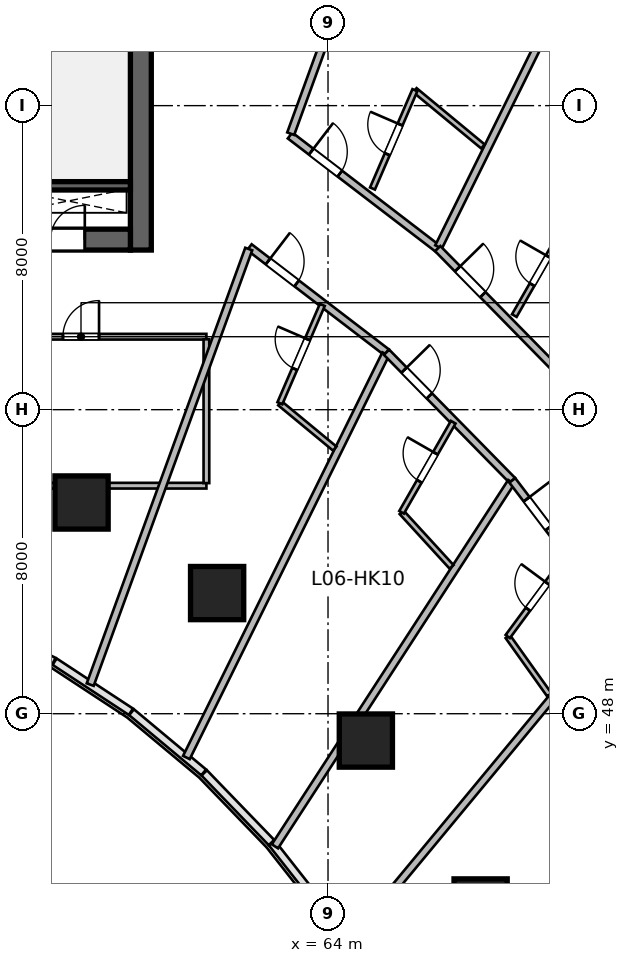
"""IFC4 building model, lengths in metres.
Left out: names, types, materials, properties, quantities, classifications, styles, units other than length and angle.
Written with IfcOpenShell. Run it as: python <this file> out.ifc"""

import sys

from ifc_helpers import new_model, si_unit, direction, frame, frame_2d, origin, origin_2d, place, context, subcontext, project, spatial, rectangle, circle, extrude, source, transform, mapped, element, fill, save


model = new_model("IFC4")
c1 = context("Model", 3, precision=1e-05, world=origin(), true_north=direction((0.0, 1.0)))
c2 = subcontext(c1, "Body", "Model", "MODEL_VIEW")
j1 = project(units=[si_unit("LENGTHUNIT", "METRE"), si_unit("PLANEANGLEUNIT", "RADIAN")], contexts=[c1])
p1 = place(None, origin())
s1 = spatial("IfcSite", under=j1, at=p1, CompositionType="ELEMENT")
p2 = place(p1, origin())
s2 = spatial("IfcBuilding", under=s1, at=p2, CompositionType="ELEMENT")
p3 = place(p2, frame((0.0, 0.0, 35.4)))
s3 = spatial("IfcBuildingStorey", under=s2, at=p3, CompositionType="ELEMENT", Elevation=35.4)
m1 = source(origin(), c2, "Body", "SweptSolid", [
    extrude(rectangle(XDim=12.0, YDim=0.55, at=frame_2d((6.0, 0.0))), origin(), (0.0, 0.0, 1.0), 3.6),
])
p4 = place(p3, frame((59.075, 60.2, 0.0), z_axis=(0.0, 0.0, 1.0), x_axis=(0.0, 1.0, 0.0)))
e1 = element("IfcWall", 1, at=p4, inside=s3, PredefinedType="SHEAR", context=c2, shape_type="MappedRepresentation", body=[
    mapped(m1, transform((0.0, 0.0, 0.0), scale=1.0)),
])
m2 = source(origin(), c2, "Body", "SweptSolid", [
    extrude(rectangle(XDim=21.6, YDim=0.55, at=frame_2d((10.8, 0.0))), origin(), (0.0, 0.0, 1.0), 3.6),
])
p5 = place(p3, frame((37.2, 60.475, 0.0), z_axis=(0.0, 0.0, 1.0), x_axis=(1.0, 0.0, 0.0)))
e2 = element("IfcWall", 2, at=p5, inside=s3, PredefinedType="SHEAR", context=c2, shape_type="MappedRepresentation", body=[
    mapped(m2, transform((0.0, 0.0, 0.0), scale=1.0)),
])
p6 = place(p5, frame((1.1, 0.0, 0.0)))
e3 = element("IfcOpeningElement", 3, at=p6, cuts=e2, PredefinedType="OPENING", context=c2, shape_type="SweptSolid", body=[
    extrude(rectangle(XDim=1.15, YDim=2.15, at=frame_2d((0.575, 1.075))), frame((0.0, 0.285, 0.0), z_axis=(0.0, -1.0, 0.0), x_axis=(1.0, 0.0, 0.0)), (0.0, 0.0, 1.0), 0.57),
])
p7 = place(p5, frame((19.5, 0.0, 0.0)))
e4 = element("IfcOpeningElement", 4, at=p7, cuts=e2, PredefinedType="OPENING", context=c2, shape_type="SweptSolid", body=[
    extrude(rectangle(XDim=0.9, YDim=2.1, at=frame_2d((0.45, 1.05))), frame((0.0, 0.285, 0.0), z_axis=(0.0, -1.0, 0.0), x_axis=(1.0, 0.0, 0.0)), (0.0, 0.0, 1.0), 0.57),
])
p8 = place(p5, frame((12.02, 0.0, 0.0)))
e5 = element("IfcOpeningElement", 5, at=p8, cuts=e2, PredefinedType="OPENING", context=c2, shape_type="SweptSolid", body=[
    extrude(rectangle(XDim=1.6, YDim=2.15, at=frame_2d((0.8, 1.075))), frame((0.0, 0.285, 0.0), z_axis=(0.0, -1.0, 0.0), x_axis=(1.0, 0.0, 0.0)), (0.0, 0.0, 1.0), 0.57),
])
m3 = source(origin(), c2, "Body", "SweptSolid", [
    extrude(rectangle(XDim=3.27, YDim=0.22, at=frame_2d((1.635, 0.0))), origin(), (0.0, 0.0, 1.0), 3.6),
])
p9 = place(p3, frame((55.53, 61.89, 0.0), z_axis=(0.0, 0.0, 1.0), x_axis=(1.0, 0.0, 0.0)))
e6 = element("IfcWall", 6, at=p9, inside=s3, PredefinedType="SHEAR", context=c2, shape_type="MappedRepresentation", body=[
    mapped(m3, transform((0.0, 0.0, 0.0), scale=1.0)),
])
m4 = source(origin(), c2, "Body", "SweptSolid", [
    extrude(circle(Radius=0.7, at=origin_2d()), origin(), (0.0, 0.0, 1.0), 3.6),
])
for number, where, z_axis, x_axis in (
    (7, (57.515, 53.558, 0.0), (0.0, 0.0, 1.0), (0.289, 0.957, 0.0)),
    (8, (61.082, 51.175, 0.0), (0.0, 0.0, 1.0), (0.409, 0.912, 0.0)),
    (9, (64.996, 47.294, 0.0), (0.0, 0.0, 1.0), (0.558, 0.83, 0.0)),
    (10, (68.015, 42.955, 0.0), (0.0, 0.0, 1.0), (0.691, 0.723, 0.0)),
):
    element("IfcColumn", number, at=place(p3, frame(where, z_axis=z_axis, x_axis=x_axis)), inside=s3, PredefinedType="COLUMN", context=c2, shape_type="MappedRepresentation", body=[
        mapped(m4, transform((0.0, 0.0, 0.0), scale=1.0)),
    ])
m5 = source(origin(), c2, "Body", "SweptSolid", [
    extrude(rectangle(XDim=6.6, YDim=0.15, at=frame_2d((3.3, 0.0))), origin(), (0.0, 0.0, 1.0), 2.803),
])
p10 = place(p3, frame((54.2, 54.0, 0.0), z_axis=(0.0, 0.0, 1.0), x_axis=(1.0, 0.0, 0.0)))
e11 = element("IfcWall", 11, at=p10, inside=s3, PredefinedType="PARTITIONING", context=c2, shape_type="MappedRepresentation", body=[
    mapped(m5, transform((0.0, 0.0, 0.0), scale=1.0)),
])
m6 = source(origin(), c2, "Body", "SweptSolid", [
    extrude(rectangle(XDim=6.6, YDim=0.15, at=frame_2d((3.3, 0.0))), origin(), (0.0, 0.0, 1.0), 3.36),
])
p11 = place(p3, frame((54.2, 57.92, 0.0), z_axis=(0.0, 0.0, 1.0), x_axis=(1.0, 0.0, 0.0)))
e12 = element("IfcWall", 12, at=p11, inside=s3, PredefinedType="PARTITIONING", context=c2, shape_type="MappedRepresentation", body=[
    mapped(m6, transform((0.0, 0.0, 0.0), scale=1.0)),
])
p12 = place(p11, frame((2.825, 0.0, 0.0)))
e13 = element("IfcOpeningElement", 13, at=p12, cuts=e12, PredefinedType="OPENING", context=c2, shape_type="SweptSolid", body=[
    extrude(rectangle(XDim=0.95, YDim=2.1, at=frame_2d((0.475, 1.05))), frame((0.0, 0.085, 0.0), z_axis=(0.0, -1.0, 0.0), x_axis=(1.0, 0.0, 0.0)), (0.0, 0.0, 1.0), 0.17),
])
m7 = source(origin(), c2, "Body", "SweptSolid", [
    extrude(rectangle(XDim=3.785, YDim=0.15, at=frame_2d((1.893, 0.0))), origin(), (0.0, 0.0, 1.0), 3.36),
])
p13 = place(p3, frame((60.8, 54.067, 0.0), z_axis=(0.0, 0.0, 1.0), x_axis=(0.0, 1.0, 0.0)))
e14 = element("IfcWall", 14, at=p13, inside=s3, PredefinedType="PARTITIONING", context=c2, shape_type="MappedRepresentation", body=[
    mapped(m7, transform((0.0, 0.0, 0.0), scale=1.0)),
])
m8 = source(origin(), c2, "Body", "SweptSolid", [
    extrude(rectangle(XDim=4.895, YDim=0.195, at=frame_2d((2.447, 0.0))), origin(), (0.0, 0.0, 1.0), 3.36),
])
p14 = place(p3, frame((63.001, 63.214, 0.0), z_axis=(0.0, 0.0, 1.0), x_axis=(0.793896075849, -0.608053468661, 0.0)))
e15 = element("IfcWall", 15, at=p14, inside=s3, PredefinedType="PARTITIONING", context=c2, shape_type="MappedRepresentation", body=[
    mapped(m8, transform((0.0, 0.0, 0.0), scale=1.0)),
])
p15 = place(p14, frame((0.7, 0.0, 0.0)))
e16 = element("IfcOpeningElement", 16, at=p15, cuts=e15, PredefinedType="OPENING", context=c2, shape_type="SweptSolid", body=[
    extrude(rectangle(XDim=0.95, YDim=2.15, at=frame_2d((0.475, 1.075))), frame((0.0, 0.107, 0.0), z_axis=(0.0, -1.0, 0.0), x_axis=(1.0, 0.0, 0.0)), (0.0, 0.0, 1.0), 0.215),
])
m9 = source(origin(), c2, "Body", "SweptSolid", [
    extrude(rectangle(XDim=12.088, YDim=0.195, at=frame_2d((6.044, 0.0))), origin(), (0.0, 0.0, 1.0), 3.36),
])
p16 = place(p3, frame((63.019, 63.262, 0.0), z_axis=(0.0, 0.0, 1.0), x_axis=(0.34203007529, 0.939689005787, 0.0)))
e17 = element("IfcWall", 17, at=p16, inside=s3, PredefinedType="PARTITIONING", context=c2, shape_type="MappedRepresentation", body=[
    mapped(m9, transform((0.0, 0.0, 0.0), scale=1.0)),
])
m10 = source(origin(), c2, "Body", "SweptSolid", [
    extrude(rectangle(XDim=11.77, YDim=0.195, at=frame_2d((5.885, 0.0))), origin(), (0.0, 0.0, 1.0), 3.36),
])
p17 = place(p3, frame((66.909, 60.282, 0.0), z_axis=(0.0, 0.0, 1.0), x_axis=(0.44286060326, 0.896590478468, 0.0)))
e18 = element("IfcWall", 18, at=p17, inside=s3, PredefinedType="PARTITIONING", context=c2, shape_type="MappedRepresentation", body=[
    mapped(m10, transform((0.0, 0.0, 0.0), scale=1.0)),
])
m11 = source(origin(), c2, "Body", "SweptSolid", [
    extrude(rectangle(XDim=2.324, YDim=0.14, at=frame_2d((1.162, 0.0))), origin(), (0.0, 0.0, 1.0), 3.36),
])
p18 = place(p3, frame((66.286, 64.407, 0.0), z_axis=(0.0, 0.0, 1.0), x_axis=(0.770746444956, -0.637141991701, 0.0)))
e19 = element("IfcWall", 19, at=p18, inside=s3, PredefinedType="PARTITIONING", context=c2, shape_type="MappedRepresentation", body=[
    mapped(m11, transform((0.0, 0.0, 0.0), scale=1.0)),
])
m12 = source(origin(), c2, "Body", "SweptSolid", [
    extrude(rectangle(XDim=2.818, YDim=0.14, at=frame_2d((1.409, 0.0))), origin(), (0.0, 0.0, 1.0), 3.36),
])
p19 = place(p3, frame((65.17, 61.819, 0.0), z_axis=(0.0, 0.0, 1.0), x_axis=(0.395894859341, 0.918295845764, 0.0)))
e20 = element("IfcWall", 20, at=p19, inside=s3, PredefinedType="PARTITIONING", context=c2, shape_type="MappedRepresentation", body=[
    mapped(m12, transform((0.0, 0.0, 0.0), scale=1.0)),
])
p20 = place(p19, frame((0.984, 0.0, 0.0)))
e21 = element("IfcOpeningElement", 21, at=p20, cuts=e20, PredefinedType="OPENING", context=c2, shape_type="SweptSolid", body=[
    extrude(rectangle(XDim=0.85, YDim=2.05, at=frame_2d((0.425, 1.025))), frame((0.0, 0.08, 0.0), z_axis=(0.0, -1.0, 0.0), x_axis=(1.0, 0.0, 0.0)), (0.0, 0.0, 1.0), 0.16),
])
m13 = source(origin(), c2, "Body", "SweptSolid", [
    extrude(rectangle(XDim=4.546, YDim=0.195, at=frame_2d((2.273, 0.0))), origin(), (0.0, 0.0, 1.0), 3.36),
])
p21 = place(p3, frame((61.931, 60.275, 0.0), z_axis=(0.0, 0.0, 1.0), x_axis=(0.793907931297, -0.608037989457, 0.0)))
e22 = element("IfcWall", 22, at=p21, inside=s3, PredefinedType="PARTITIONING", context=c2, shape_type="MappedRepresentation", body=[
    mapped(m13, transform((0.0, 0.0, 0.0), scale=1.0)),
])
p22 = place(p21, frame((0.616, 0.0, 0.0)))
e23 = element("IfcOpeningElement", 23, at=p22, cuts=e22, PredefinedType="OPENING", context=c2, shape_type="SweptSolid", body=[
    extrude(rectangle(XDim=0.95, YDim=2.15, at=frame_2d((0.475, 1.075))), frame((0.0, 0.107, 0.0), z_axis=(0.0, -1.0, 0.0), x_axis=(1.0, 0.0, 0.0)), (0.0, 0.0, 1.0), 0.215),
])
m14 = source(origin(), c2, "Body", "SweptSolid", [
    extrude(rectangle(XDim=12.196, YDim=0.195, at=frame_2d((6.098, 0.0))), origin(), (0.0, 0.0, 1.0), 3.36),
])
p23 = place(p3, frame((57.742, 48.766, 0.0), z_axis=(0.0, 0.0, 1.0), x_axis=(0.342022711534, 0.939691686031, 0.0)))
e24 = element("IfcWall", 24, at=p23, inside=s3, PredefinedType="PARTITIONING", context=c2, shape_type="MappedRepresentation", body=[
    mapped(m14, transform((0.0, 0.0, 0.0), scale=1.0)),
])
m15 = source(origin(), c2, "Body", "SweptSolid", [
    extrude(rectangle(XDim=11.844, YDim=0.195, at=frame_2d((5.922, 0.0))), origin(), (0.0, 0.0, 1.0), 3.36),
])
p24 = place(p3, frame((60.273, 46.848, 0.0), z_axis=(0.0, 0.0, 1.0), x_axis=(0.442871152218, 0.896585267854, 0.0)))
e25 = element("IfcWall", 25, at=p24, inside=s3, PredefinedType="PARTITIONING", context=c2, shape_type="MappedRepresentation", body=[
    mapped(m15, transform((0.0, 0.0, 0.0), scale=1.0)),
])
m16 = source(origin(), c2, "Body", "SweptSolid", [
    extrude(rectangle(XDim=1.873, YDim=0.14, at=frame_2d((0.937, 0.0))), origin(), (0.0, 0.0, 1.0), 3.36),
])
p25 = place(p3, frame((62.734, 56.169, 0.0), z_axis=(0.0, 0.0, 1.0), x_axis=(0.77069451688, -0.637204803537, 0.0)))
e26 = element("IfcWall", 26, at=p25, inside=s3, PredefinedType="PARTITIONING", context=c2, shape_type="MappedRepresentation", body=[
    mapped(m16, transform((0.0, 0.0, 0.0), scale=1.0)),
])
m17 = source(origin(), c2, "Body", "SweptSolid", [
    extrude(rectangle(XDim=2.817, YDim=0.14, at=frame_2d((1.409, 0.0))), origin(), (0.0, 0.0, 1.0), 3.36),
])
p26 = place(p3, frame((62.734, 56.169, 0.0), z_axis=(0.0, 0.0, 1.0), x_axis=(0.395999429727, 0.918250756415, 0.0)))
e27 = element("IfcWall", 27, at=p26, inside=s3, PredefinedType="PARTITIONING", context=c2, shape_type="MappedRepresentation", body=[
    mapped(m17, transform((0.0, 0.0, 0.0), scale=1.0)),
])
p27 = place(p26, frame((0.984, 0.0, 0.0)))
e28 = element("IfcOpeningElement", 28, at=p27, cuts=e27, PredefinedType="OPENING", context=c2, shape_type="SweptSolid", body=[
    extrude(rectangle(XDim=0.85, YDim=2.05, at=frame_2d((0.425, 1.025))), frame((0.0, 0.08, 0.0), z_axis=(0.0, -1.0, 0.0), x_axis=(1.0, 0.0, 0.0)), (0.0, 0.0, 1.0), 0.16),
])
m18 = source(origin(), c2, "Body", "SweptSolid", [
    extrude(rectangle(XDim=5.087, YDim=0.195, at=frame_2d((2.543, 0.0))), origin(), (0.0, 0.0, 1.0), 3.36),
])
p28 = place(p3, frame((66.887, 60.238, 0.0), z_axis=(0.0, 0.0, 1.0), x_axis=(0.700428330775, -0.7137227427, 0.0)))
e29 = element("IfcWall", 29, at=p28, inside=s3, PredefinedType="PARTITIONING", context=c2, shape_type="MappedRepresentation", body=[
    mapped(m18, transform((0.0, 0.0, 0.0), scale=1.0)),
])
p29 = place(p28, frame((0.746, 0.0, 0.0)))
e30 = element("IfcOpeningElement", 30, at=p29, cuts=e29, PredefinedType="OPENING", context=c2, shape_type="SweptSolid", body=[
    extrude(rectangle(XDim=0.95, YDim=2.15, at=frame_2d((0.475, 1.075))), frame((0.0, 0.107, 0.0), z_axis=(0.0, -1.0, 0.0), x_axis=(1.0, 0.0, 0.0)), (0.0, 0.0, 1.0), 0.215),
])
m19 = source(origin(), c2, "Body", "SweptSolid", [
    extrude(rectangle(XDim=2.732, YDim=0.14, at=frame_2d((1.366, 0.0))), origin(), (0.0, 0.0, 1.0), 3.36),
])
p30 = place(p3, frame((68.902, 58.476, 0.0), z_axis=(0.0, 0.0, 1.0), x_axis=(0.497254966372, 0.867604459658, 0.0)))
e31 = element("IfcWall", 31, at=p30, inside=s3, PredefinedType="PARTITIONING", context=c2, shape_type="MappedRepresentation", body=[
    mapped(m19, transform((0.0, 0.0, 0.0), scale=1.0)),
])
p31 = place(p30, frame((0.941, 0.0, 0.0)))
e32 = element("IfcOpeningElement", 32, at=p31, cuts=e31, PredefinedType="OPENING", context=c2, shape_type="SweptSolid", body=[
    extrude(rectangle(XDim=0.85, YDim=2.05, at=frame_2d((0.425, 1.025))), frame((0.0, 0.08, 0.0), z_axis=(0.0, -1.0, 0.0), x_axis=(1.0, 0.0, 0.0)), (0.0, 0.0, 1.0), 0.16),
])
m20 = source(origin(), c2, "Body", "SweptSolid", [
    extrude(rectangle(XDim=4.724, YDim=0.195, at=frame_2d((2.362, 0.0))), origin(), (0.0, 0.0, 1.0), 3.36),
])
p32 = place(p3, frame((65.541, 57.511, 0.0), z_axis=(0.0, 0.0, 1.0), x_axis=(0.700435057457, -0.713716141253, 0.0)))
e33 = element("IfcWall", 33, at=p32, inside=s3, PredefinedType="PARTITIONING", context=c2, shape_type="MappedRepresentation", body=[
    mapped(m20, transform((0.0, 0.0, 0.0), scale=1.0)),
])
p33 = place(p32, frame((0.659, 0.0, 0.0)))
e34 = element("IfcOpeningElement", 34, at=p33, cuts=e33, PredefinedType="OPENING", context=c2, shape_type="SweptSolid", body=[
    extrude(rectangle(XDim=0.95, YDim=2.15, at=frame_2d((0.475, 1.075))), frame((0.0, 0.107, 0.0), z_axis=(0.0, -1.0, 0.0), x_axis=(1.0, 0.0, 0.0)), (0.0, 0.0, 1.0), 0.215),
])
m21 = source(origin(), c2, "Body", "SweptSolid", [
    extrude(rectangle(XDim=11.429, YDim=0.195, at=frame_2d((5.714, 0.0))), origin(), (0.0, 0.0, 1.0), 3.36),
])
p34 = place(p3, frame((62.604, 44.511, 0.0), z_axis=(0.0, 0.0, 1.0), x_axis=(0.544215487077, 0.838945471187, 0.0)))
e35 = element("IfcWall", 35, at=p34, inside=s3, PredefinedType="PARTITIONING", context=c2, shape_type="MappedRepresentation", body=[
    mapped(m21, transform((0.0, 0.0, 0.0), scale=1.0)),
])
m22 = source(origin(), c2, "Body", "SweptSolid", [
    extrude(rectangle(XDim=1.947, YDim=0.14, at=frame_2d((0.973, 0.0))), origin(), (0.0, 0.0, 1.0), 3.36),
])
p35 = place(p3, frame((65.936, 53.3, 0.0), z_axis=(0.0, 0.0, 1.0), x_axis=(0.675383794012, -0.737466426888, 0.0)))
e36 = element("IfcWall", 36, at=p35, inside=s3, PredefinedType="PARTITIONING", context=c2, shape_type="MappedRepresentation", body=[
    mapped(m22, transform((0.0, 0.0, 0.0), scale=1.0)),
])
m23 = source(origin(), c2, "Body", "SweptSolid", [
    extrude(rectangle(XDim=2.731, YDim=0.14, at=frame_2d((1.366, 0.0))), origin(), (0.0, 0.0, 1.0), 3.36),
])
p36 = place(p3, frame((65.936, 53.3, 0.0), z_axis=(0.0, 0.0, 1.0), x_axis=(0.497120404056, 0.867681568244, 0.0)))
e37 = element("IfcWall", 37, at=p36, inside=s3, PredefinedType="PARTITIONING", context=c2, shape_type="MappedRepresentation", body=[
    mapped(m23, transform((0.0, 0.0, 0.0), scale=1.0)),
])
p37 = place(p36, frame((0.941, 0.0, 0.0)))
e38 = element("IfcOpeningElement", 38, at=p37, cuts=e37, PredefinedType="OPENING", context=c2, shape_type="SweptSolid", body=[
    extrude(rectangle(XDim=0.85, YDim=2.05, at=frame_2d((0.425, 1.025))), frame((0.0, 0.08, 0.0), z_axis=(0.0, -1.0, 0.0), x_axis=(1.0, 0.0, 0.0)), (0.0, 0.0, 1.0), 0.16),
])
m24 = source(origin(), c2, "Body", "SweptSolid", [
    extrude(rectangle(XDim=4.576, YDim=0.195, at=frame_2d((2.288, 0.0))), origin(), (0.0, 0.0, 1.0), 3.36),
])
p38 = place(p3, frame((68.85, 54.139, 0.0), z_axis=(0.0, 0.0, 1.0), x_axis=(0.604795096156, -0.796381122118, 0.0)))
e39 = element("IfcWall", 39, at=p38, inside=s3, PredefinedType="PARTITIONING", context=c2, shape_type="MappedRepresentation", body=[
    mapped(m24, transform((0.0, 0.0, 0.0), scale=1.0)),
])
p39 = place(p38, frame((0.623, 0.0, 0.0)))
e40 = element("IfcOpeningElement", 40, at=p39, cuts=e39, PredefinedType="OPENING", context=c2, shape_type="SweptSolid", body=[
    extrude(rectangle(XDim=0.95, YDim=2.15, at=frame_2d((0.475, 1.075))), frame((0.0, 0.107, 0.0), z_axis=(0.0, -1.0, 0.0), x_axis=(1.0, 0.0, 0.0)), (0.0, 0.0, 1.0), 0.215),
])
m25 = source(origin(), c2, "Body", "SweptSolid", [
    extrude(rectangle(XDim=11.053, YDim=0.195, at=frame_2d((5.527, 0.0))), origin(), (0.0, 0.0, 1.0), 3.36),
])
p40 = place(p3, frame((64.534, 41.949, 0.0), z_axis=(0.0, 0.0, 1.0), x_axis=(0.638131235571, 0.769927611005, 0.0)))
e41 = element("IfcWall", 41, at=p40, inside=s3, PredefinedType="PARTITIONING", context=c2, shape_type="MappedRepresentation", body=[
    mapped(m25, transform((0.0, 0.0, 0.0), scale=1.0)),
])
m26 = source(origin(), c2, "Body", "SweptSolid", [
    extrude(rectangle(XDim=1.884, YDim=0.14, at=frame_2d((0.942, 0.0))), origin(), (0.0, 0.0, 1.0), 3.36),
])
p41 = place(p3, frame((68.729, 50.031, 0.0), z_axis=(0.0, 0.0, 1.0), x_axis=(0.580833492897, -0.814022391295, 0.0)))
e42 = element("IfcWall", 42, at=p41, inside=s3, PredefinedType="PARTITIONING", context=c2, shape_type="MappedRepresentation", body=[
    mapped(m26, transform((0.0, 0.0, 0.0), scale=1.0)),
])
m27 = source(origin(), c2, "Body", "SweptSolid", [
    extrude(rectangle(XDim=2.64, YDim=0.14, at=frame_2d((1.32, 0.0))), origin(), (0.0, 0.0, 1.0), 3.36),
])
p42 = place(p3, frame((68.729, 50.031, 0.0), z_axis=(0.0, 0.0, 1.0), x_axis=(0.594674469522, 0.803966588422, 0.0)))
e43 = element("IfcWall", 43, at=p42, inside=s3, PredefinedType="PARTITIONING", context=c2, shape_type="MappedRepresentation", body=[
    mapped(m27, transform((0.0, 0.0, 0.0), scale=1.0)),
])
p43 = place(p42, frame((0.895, 0.0, 0.0)))
e44 = element("IfcOpeningElement", 44, at=p43, cuts=e43, PredefinedType="OPENING", context=c2, shape_type="SweptSolid", body=[
    extrude(rectangle(XDim=0.85, YDim=2.05, at=frame_2d((0.425, 1.025))), frame((0.0, 0.08, 0.0), z_axis=(0.0, -1.0, 0.0), x_axis=(1.0, 0.0, 0.0)), (0.0, 0.0, 1.0), 0.16),
])
m28 = source(origin(), c2, "Body", "SweptSolid", [
    extrude(rectangle(XDim=0.9, YDim=2.1, at=frame_2d((0.45, 1.05))), frame((0.0, 0.025, 0.0), z_axis=(0.0, -1.0, 0.0), x_axis=(1.0, 0.0, 0.0)), (0.0, 0.0, 1.0), 0.05),
])
p44 = place(p7, origin())
e45 = element("IfcDoor", 45, at=p44, inside=s3, OperationType="SINGLE_SWING_RIGHT", PredefinedType="DOOR", context=c2, shape_type="MappedRepresentation", body=[
    mapped(m28, transform((0.0, 0.0, 0.0), scale=1.0)),
])
fill(e4, e45)
m29 = source(origin(), c2, "Body", "SweptSolid", [
    extrude(rectangle(XDim=0.95, YDim=2.1, at=frame_2d((0.475, 1.05))), frame((0.0, 0.025, 0.0), z_axis=(0.0, -1.0, 0.0), x_axis=(1.0, 0.0, 0.0)), (0.0, 0.0, 1.0), 0.05),
])
p45 = place(p12, origin())
e46 = element("IfcDoor", 46, at=p45, inside=s3, OperationType="SINGLE_SWING_RIGHT", PredefinedType="DOOR", context=c2, shape_type="MappedRepresentation", body=[
    mapped(m29, transform((0.0, 0.0, 0.0), scale=1.0)),
])
fill(e13, e46)
m30 = source(origin(), c2, "Body", "SweptSolid", [
    extrude(rectangle(XDim=0.95, YDim=2.15, at=frame_2d((0.475, 1.075))), frame((0.0, 0.025, 0.0), z_axis=(0.0, -1.0, 0.0), x_axis=(1.0, 0.0, 0.0)), (0.0, 0.0, 1.0), 0.05),
])
p46 = place(p15, origin())
e47 = element("IfcDoor", 47, at=p46, inside=s3, OperationType="SINGLE_SWING_LEFT", PredefinedType="DOOR", context=c2, shape_type="MappedRepresentation", body=[
    mapped(m30, transform((0.0, 0.0, 0.0), scale=1.0)),
])
fill(e16, e47)
m31 = source(origin(), c2, "Body", "SweptSolid", [
    extrude(rectangle(XDim=0.85, YDim=2.05, at=frame_2d((0.425, 1.025))), frame((0.0, 0.025, 0.0), z_axis=(0.0, -1.0, 0.0), x_axis=(1.0, 0.0, 0.0)), (0.0, 0.0, 1.0), 0.05),
])
p47 = place(p20, origin())
e48 = element("IfcDoor", 48, at=p47, inside=s3, OperationType="SINGLE_SWING_RIGHT", PredefinedType="DOOR", context=c2, shape_type="MappedRepresentation", body=[
    mapped(m31, transform((0.0, 0.0, 0.0), scale=1.0)),
])
fill(e21, e48)
p48 = place(p22, origin())
e49 = element("IfcDoor", 49, at=p48, inside=s3, OperationType="SINGLE_SWING_LEFT", PredefinedType="DOOR", context=c2, shape_type="MappedRepresentation", body=[
    mapped(m30, transform((0.0, 0.0, 0.0), scale=1.0)),
])
fill(e23, e49)
p49 = place(p27, origin())
e50 = element("IfcDoor", 50, at=p49, inside=s3, OperationType="SINGLE_SWING_RIGHT", PredefinedType="DOOR", context=c2, shape_type="MappedRepresentation", body=[
    mapped(m31, transform((0.0, 0.0, 0.0), scale=1.0)),
])
fill(e28, e50)
p50 = place(p29, origin())
e51 = element("IfcDoor", 51, at=p50, inside=s3, OperationType="SINGLE_SWING_LEFT", PredefinedType="DOOR", context=c2, shape_type="MappedRepresentation", body=[
    mapped(m30, transform((0.0, 0.0, 0.0), scale=1.0)),
])
fill(e30, e51)
p51 = place(p31, origin())
e52 = element("IfcDoor", 52, at=p51, inside=s3, OperationType="SINGLE_SWING_RIGHT", PredefinedType="DOOR", context=c2, shape_type="MappedRepresentation", body=[
    mapped(m31, transform((0.0, 0.0, 0.0), scale=1.0)),
])
fill(e32, e52)
p52 = place(p33, origin())
e53 = element("IfcDoor", 53, at=p52, inside=s3, OperationType="SINGLE_SWING_LEFT", PredefinedType="DOOR", context=c2, shape_type="MappedRepresentation", body=[
    mapped(m30, transform((0.0, 0.0, 0.0), scale=1.0)),
])
fill(e34, e53)
p53 = place(p37, origin())
e54 = element("IfcDoor", 54, at=p53, inside=s3, OperationType="SINGLE_SWING_RIGHT", PredefinedType="DOOR", context=c2, shape_type="MappedRepresentation", body=[
    mapped(m31, transform((0.0, 0.0, 0.0), scale=1.0)),
])
fill(e38, e54)
p54 = place(p39, origin())
e55 = element("IfcDoor", 55, at=p54, inside=s3, OperationType="SINGLE_SWING_LEFT", PredefinedType="DOOR", context=c2, shape_type="MappedRepresentation", body=[
    mapped(m30, transform((0.0, 0.0, 0.0), scale=1.0)),
])
fill(e40, e55)
p55 = place(p43, origin())
e56 = element("IfcDoor", 56, at=p55, inside=s3, OperationType="SINGLE_SWING_RIGHT", PredefinedType="DOOR", context=c2, shape_type="MappedRepresentation", body=[
    mapped(m31, transform((0.0, 0.0, 0.0), scale=1.0)),
])
fill(e44, e56)
save(model, sys.argv[1])
